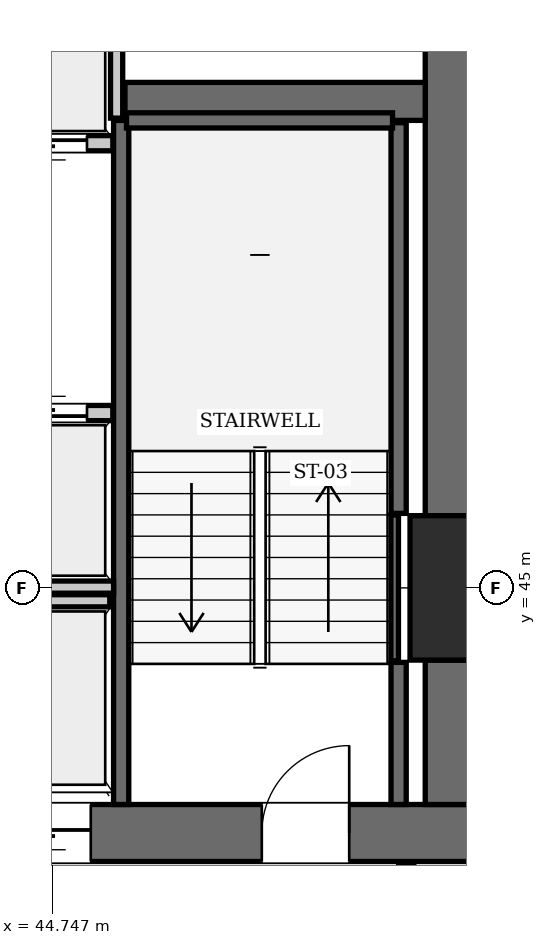
"""IFC4 building model, lengths in metres.
Left out: names, types, materials, properties, quantities, classifications, styles, units other than length and angle.
Written with IfcOpenShell. Run it as: python <this file> out.ifc"""

import sys

from ifc_helpers import new_model, si_unit, direction, frame, frame_2d, origin, origin_2d, place, context, subcontext, project, spatial, rectangle, extrude, element, fill, save


model = new_model("IFC4")
c1 = context("Model", 3, precision=1e-05, world=origin(), true_north=direction((0.0, 1.0)))
c2 = subcontext(c1, "Body", "Model", "MODEL_VIEW")
j1 = project(units=[si_unit("LENGTHUNIT", "METRE"), si_unit("PLANEANGLEUNIT", "RADIAN")], contexts=[c1])
p1 = place(None, origin())
s1 = spatial("IfcSite", under=j1, at=p1, CompositionType="ELEMENT")
p2 = place(p1, origin())
s2 = spatial("IfcBuilding", under=s1, at=p2, CompositionType="ELEMENT")
p3 = place(p2, frame((0.0, 0.0, 142.8)))
s3 = spatial("IfcBuildingStorey", under=s2, at=p3, CompositionType="ELEMENT", Elevation=142.8)
p4 = place(p3, frame((50.4, 45.0, 0.0), z_axis=(0.0, 0.0, 1.0), x_axis=(1.0, 0.0, 0.0)))
e1 = element("IfcColumn", 1, at=p4, inside=s3, PredefinedType="COLUMN", context=c2, shape_type="SweptSolid", body=[
    extrude(rectangle(XDim=1.9, YDim=1.9, at=origin_2d()), origin(), (0.0, 0.0, 1.0), 3.85),
])
p5 = place(p3, frame((43.6, 41.775, 0.0), z_axis=(0.0, 0.0, 1.0), x_axis=(1.0, 0.0, 0.0)))
e2 = element("IfcWall", 2, at=p5, inside=s3, PredefinedType="SHEAR", context=c2, shape_type="SweptSolid", body=[
    extrude(rectangle(XDim=6.8, YDim=0.75, at=frame_2d((3.4, 0.0))), origin(), (0.0, 0.0, 1.0), 3.85),
])
p6 = place(p5, frame((3.9, 0.0, 0.0)))
e3 = element("IfcOpeningElement", 3, at=p6, cuts=e2, PredefinedType="OPENING", context=c2, shape_type="SweptSolid", body=[
    extrude(rectangle(XDim=1.15, YDim=2.15, at=frame_2d((0.575, 1.075))), frame((0.0, 0.385, 0.0), z_axis=(0.0, -1.0, 0.0), x_axis=(1.0, 0.0, 0.0)), (0.0, 0.0, 1.0), 0.77),
])
p7 = place(p5, frame((0.55, 0.0, 0.0)))
e4 = element("IfcOpeningElement", 4, at=p7, cuts=e2, PredefinedType="OPENING", context=c2, shape_type="SweptSolid", body=[
    extrude(rectangle(XDim=1.1, YDim=2.2, at=frame_2d((0.55, 1.1))), frame((0.0, 0.385, 0.0), z_axis=(0.0, -1.0, 0.0), x_axis=(1.0, 0.0, 0.0)), (0.0, 0.0, 1.0), 0.77),
])
p8 = place(p3, frame((50.025, 42.15, 0.0), z_axis=(0.0, 0.0, 1.0), x_axis=(0.0, 1.0, 0.0)))
e5 = element("IfcWall", 5, at=p8, inside=s3, PredefinedType="SHEAR", context=c2, shape_type="SweptSolid", body=[
    extrude(rectangle(XDim=1.9, YDim=0.75, at=frame_2d((0.95, 0.0))), origin(), (0.0, 0.0, 1.0), 3.85),
])
p9 = place(p3, frame((50.025, 45.95, 0.0), z_axis=(0.0, 0.0, 1.0), x_axis=(0.0, 1.0, 0.0)))
e6 = element("IfcWall", 6, at=p9, inside=s3, PredefinedType="SHEAR", context=c2, shape_type="SweptSolid", body=[
    extrude(rectangle(XDim=7.3, YDim=0.75, at=frame_2d((3.65, 0.0))), origin(), (0.0, 0.0, 1.0), 3.85),
])
p10 = place(p3, frame((45.7, 51.4, 0.0), z_axis=(0.0, 0.0, 1.0), x_axis=(1.0, 0.0, 0.0)))
e7 = element("IfcWall", 7, at=p10, inside=s3, PredefinedType="SHEAR", context=c2, shape_type="SweptSolid", body=[
    extrude(rectangle(XDim=3.95, YDim=0.5, at=frame_2d((1.975, 0.0))), origin(), (0.0, 0.0, 1.0), 3.85),
])
p11 = place(p3, frame((45.65, 42.15, 0.0), z_axis=(0.0, 0.0, 1.0), x_axis=(0.0, 1.0, 0.0)))
e8 = element("IfcWall", 8, at=p11, inside=s3, PredefinedType="SOLIDWALL", context=c2, shape_type="SweptSolid", body=[
    extrude(rectangle(XDim=9.0, YDim=0.2, at=frame_2d((4.5, 0.0))), origin(), (0.0, 0.0, 1.0), 3.61),
])
p12 = place(p3, frame((49.3, 42.15, 0.0), z_axis=(0.0, 0.0, 1.0), x_axis=(0.0, 1.0, 0.0)))
e9 = element("IfcWall", 9, at=p12, inside=s3, PredefinedType="SOLIDWALL", context=c2, shape_type="SweptSolid", body=[
    extrude(rectangle(XDim=1.87, YDim=0.2, at=frame_2d((0.935, 0.0))), origin(), (0.0, 0.0, 1.0), 3.61),
])
p13 = place(p3, frame((49.3, 45.98, 0.0), z_axis=(0.0, 0.0, 1.0), x_axis=(0.0, 1.0, 0.0)))
e10 = element("IfcWall", 10, at=p13, inside=s3, PredefinedType="SOLIDWALL", context=c2, shape_type="SweptSolid", body=[
    extrude(rectangle(XDim=5.14, YDim=0.2, at=frame_2d((2.57, 0.0))), origin(), (0.0, 0.0, 1.0), 3.61),
])
p14 = place(p3, frame((45.72, 51.15, 0.0), z_axis=(0.0, 0.0, 1.0), x_axis=(1.0, 0.0, 0.0)))
e11 = element("IfcWall", 11, at=p14, inside=s3, PredefinedType="SOLIDWALL", context=c2, shape_type="SweptSolid", body=[
    extrude(rectangle(XDim=3.5, YDim=0.2, at=frame_2d((1.75, 0.0))), origin(), (0.0, 0.0, 1.0), 3.61),
])
p15 = place(p3, frame((49.248, 44.04, 0.0), z_axis=(0.0, 0.0, 1.0), x_axis=(0.0, 1.0, 0.0)))
e12 = element("IfcWall", 12, at=p15, inside=s3, PredefinedType="SOLIDWALL", context=c2, shape_type="SweptSolid", body=[
    extrude(rectangle(XDim=1.92, YDim=0.1, at=frame_2d((0.96, 0.0))), origin(), (0.0, 0.0, 1.0), 3.61),
])
p16 = place(p3, frame((43.86, 47.3, 0.0), z_axis=(0.0, 0.0, 1.0), x_axis=(1.0, 0.0, 0.0)))
e13 = element("IfcWall", 13, at=p16, inside=s3, PredefinedType="SOLIDWALL", context=c2, shape_type="SweptSolid", body=[
    extrude(rectangle(XDim=1.68, YDim=0.2, at=frame_2d((0.84, 0.0))), origin(), (0.0, 0.0, 1.0), 3.61),
])
p17 = place(p16, frame((0.34, 0.0, 0.0)))
e14 = element("IfcOpeningElement", 14, at=p17, cuts=e13, PredefinedType="OPENING", context=c2, shape_type="SweptSolid", body=[
    extrude(rectangle(XDim=1.0, YDim=2.15, at=frame_2d((0.5, 1.075))), frame((0.0, 0.11, 0.0), z_axis=(0.0, -1.0, 0.0), x_axis=(1.0, 0.0, 0.0)), (0.0, 0.0, 1.0), 0.22),
])
p18 = place(p3, frame((43.86, 50.85, 0.0), z_axis=(0.0, 0.0, 1.0), x_axis=(1.0, 0.0, 0.0)))
e15 = element("IfcWall", 15, at=p18, inside=s3, PredefinedType="SOLIDWALL", context=c2, shape_type="SweptSolid", body=[
    extrude(rectangle(XDim=1.68, YDim=0.2, at=frame_2d((0.84, 0.0))), origin(), (0.0, 0.0, 1.0), 3.61),
])
p19 = place(p18, frame((0.34, 0.0, 0.0)))
e16 = element("IfcOpeningElement", 16, at=p19, cuts=e15, PredefinedType="OPENING", context=c2, shape_type="SweptSolid", body=[
    extrude(rectangle(XDim=1.0, YDim=2.15, at=frame_2d((0.5, 1.075))), frame((0.0, 0.11, 0.0), z_axis=(0.0, -1.0, 0.0), x_axis=(1.0, 0.0, 0.0)), (0.0, 0.0, 1.0), 0.22),
])
p20 = place(p3, frame((43.9, 44.83, 0.0), z_axis=(0.0, 0.0, 1.0), x_axis=(1.0, 0.0, 0.0)))
e17 = element("IfcWall", 17, at=p20, inside=s3, PredefinedType="SOLIDWALL", context=c2, shape_type="SweptSolid", body=[
    extrude(rectangle(XDim=1.6, YDim=0.16, at=frame_2d((0.8, 0.0))), origin(), (0.0, 0.0, 1.0), 3.61),
])
p21 = place(p3, frame((42.1, 45.01, 0.0), z_axis=(0.0, 0.0, 1.0), x_axis=(1.0, 0.0, 0.0)))
e18 = element("IfcWall", 18, at=p21, inside=s3, PredefinedType="SOLIDWALL", context=c2, shape_type="SweptSolid", body=[
    extrude(rectangle(XDim=3.45, YDim=0.16, at=frame_2d((1.725, 0.0))), origin(), (0.0, 0.0, 1.0), 3.61),
])
p22 = place(p3, frame((45.59, 51.18, 0.0), z_axis=(0.0, 0.0, 1.0), x_axis=(0.0, 1.0, 0.0)))
e19 = element("IfcWall", 19, at=p22, inside=s3, PredefinedType="SOLIDWALL", context=c2, shape_type="SweptSolid", body=[
    extrude(rectangle(XDim=2.07, YDim=0.16, at=frame_2d((1.035, 0.0))), origin(), (0.0, 0.0, 1.0), 3.61),
])
p23 = place(p3, frame((49.4, 38.31, 0.0), z_axis=(0.0, 0.0, 1.0), x_axis=(0.0, 1.0, 0.0)))
e20 = element("IfcWall", 20, at=p23, inside=s3, PredefinedType="PARTITIONING", context=c2, shape_type="SweptSolid", body=[
    extrude(rectangle(XDim=3.07, YDim=0.2, at=frame_2d((1.535, 0.0))), origin(), (0.0, 0.0, 1.0), 3.61),
])
p24 = place(p6, origin())
e21 = element("IfcDoor", 21, at=p24, inside=s3, OperationType="SINGLE_SWING_RIGHT", PredefinedType="DOOR", context=c2, shape_type="SweptSolid", body=[
    extrude(rectangle(XDim=1.15, YDim=2.15, at=frame_2d((0.575, 1.075))), frame((0.0, 0.025, 0.0), z_axis=(0.0, -1.0, 0.0), x_axis=(1.0, 0.0, 0.0)), (0.0, 0.0, 1.0), 0.05),
])
fill(e3, e21)
p25 = place(p17, origin())
e22 = element("IfcDoor", 22, at=p25, inside=s3, OperationType="SLIDING_TO_LEFT", PredefinedType="DOOR", context=c2, shape_type="SweptSolid", body=[
    extrude(rectangle(XDim=1.0, YDim=2.15, at=frame_2d((0.5, 1.075))), frame((0.0, 0.025, 0.0), z_axis=(0.0, -1.0, 0.0), x_axis=(1.0, 0.0, 0.0)), (0.0, 0.0, 1.0), 0.05),
])
fill(e14, e22)
p26 = place(p19, frame((1.0, 0.0, 0.0), z_axis=(0.0, 0.0, 1.0), x_axis=(-1.0, 0.0, 0.0)))
e23 = element("IfcDoor", 23, at=p26, inside=s3, OperationType="SLIDING_TO_LEFT", PredefinedType="DOOR", context=c2, shape_type="SweptSolid", body=[
    extrude(rectangle(XDim=1.0, YDim=2.15, at=frame_2d((0.5, 1.075))), frame((0.0, 0.025, 0.0), z_axis=(0.0, -1.0, 0.0), x_axis=(1.0, 0.0, 0.0)), (0.0, 0.0, 1.0), 0.05),
])
fill(e16, e23)
p27 = place(p7, frame((1.1, 0.0, 0.0), z_axis=(0.0, 0.0, 1.0), x_axis=(-1.0, 0.0, 0.0)))
e24 = element("IfcDoor", 24, at=p27, inside=s3, OperationType="SLIDING_TO_LEFT", PredefinedType="DOOR", context=c2, shape_type="SweptSolid", body=[
    extrude(rectangle(XDim=1.1, YDim=2.2, at=frame_2d((0.55, 1.1))), frame((0.0, 0.025, 0.0), z_axis=(0.0, -1.0, 0.0), x_axis=(1.0, 0.0, 0.0)), (0.0, 0.0, 1.0), 0.05),
])
fill(e4, e24)
save(model, sys.argv[1])
